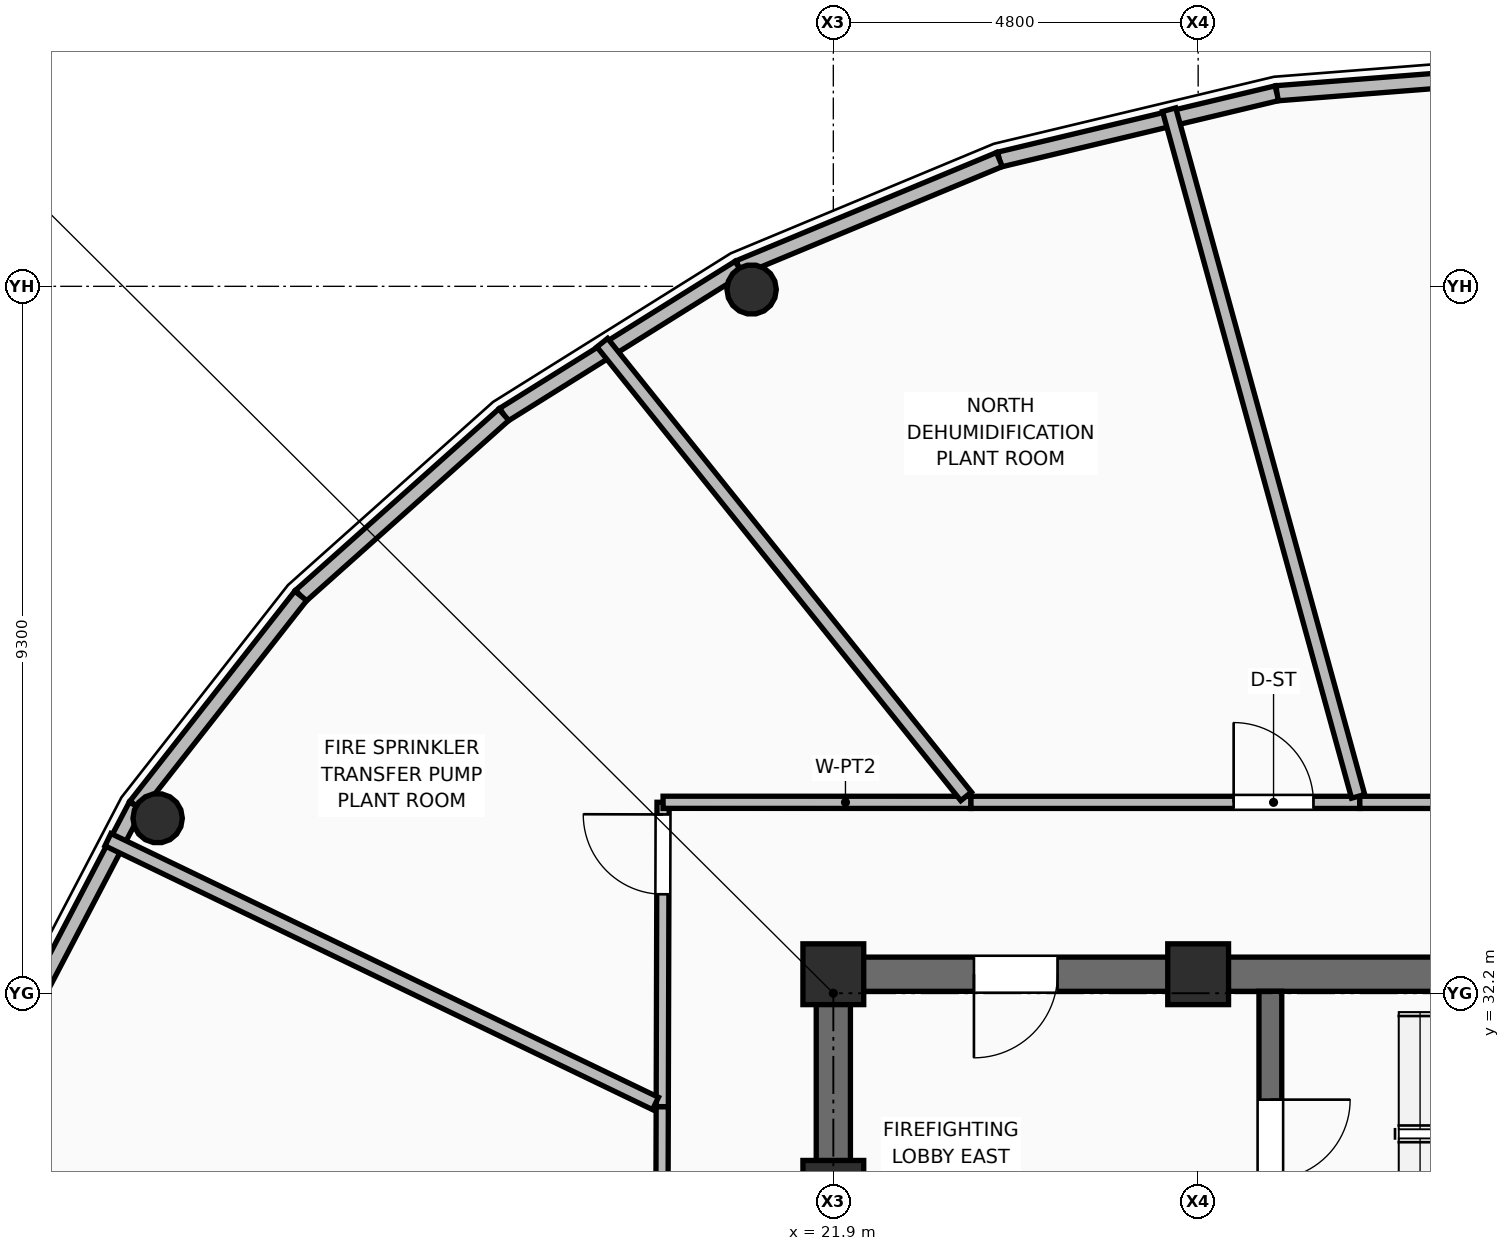
"""IFC4 building model, lengths in metres.
Left out: names, types, materials, properties, quantities, classifications, styles, units other than length and angle.
Written with IfcOpenShell. Run it as: python <this file> out.ifc"""

import sys

from ifc_helpers import new_model, si_unit, direction, frame, frame_2d, origin, origin_2d, place, context, subcontext, project, spatial, rectangle, hollow_circle, extrude, element, fill, save


model = new_model("IFC4")
c1 = context("Model", 3, precision=1e-05, world=origin(), true_north=direction((0.0, 1.0)))
c2 = subcontext(c1, "Body", "Model", "MODEL_VIEW")
j1 = project(units=[si_unit("LENGTHUNIT", "METRE"), si_unit("PLANEANGLEUNIT", "RADIAN")], contexts=[c1])
p1 = place(None, origin())
s1 = spatial("IfcSite", under=j1, at=p1, CompositionType="ELEMENT")
p2 = place(p1, origin())
s2 = spatial("IfcBuilding", under=s1, at=p2, CompositionType="ELEMENT")
p3 = place(p2, frame((0.0, 0.0, 253.65)))
s3 = spatial("IfcBuildingStorey", under=s2, at=p3, CompositionType="ELEMENT", Elevation=253.65)
for number, where, z_axis, x_axis in (
    (1, (21.9, 29.6, 0.0), (0.0, 0.0, 1.0), (1.0, 0.0, 0.0)),
    (2, (21.9, 32.45, 0.0), (0.0, 0.0, 1.0), (1.0, 0.0, 0.0)),
    (3, (26.7, 32.45, 0.0), (0.0, 0.0, 1.0), (1.0, 0.0, 0.0)),
):
    element("IfcColumn", number, at=place(p3, frame(where, z_axis=z_axis, x_axis=x_axis)), inside=s3, PredefinedType="COLUMN", context=c2, shape_type="SweptSolid", body=[
        extrude(rectangle(XDim=0.8, YDim=0.8, at=origin_2d()), origin(), (0.0, 0.0, 1.0), 5.4),
    ])
p4 = place(p3, frame((20.825, 41.458, 0.0), z_axis=(0.130171994019, -0.201410172818, 0.970818826691), x_axis=(0.839859571413, 0.542803740136, 0.0)))
e4 = element("IfcColumn", 4, at=p4, inside=s3, PredefinedType="COLUMN", context=c2, shape_type="SweptSolid", body=[
    extrude(hollow_circle(Radius=0.325, WallThickness=0.03, at=origin_2d()), origin(), (0.0, 0.0, 1.0), 5.377),
])
p5 = place(p3, frame((13.01, 34.502, 0.0), z_axis=(0.224793032222, -0.115835378923, 0.967496903175), x_axis=(0.458059425605, 0.888921572814, 0.0)))
e5 = element("IfcColumn", 5, at=p5, inside=s3, PredefinedType="COLUMN", context=c2, shape_type="SweptSolid", body=[
    extrude(hollow_circle(Radius=0.325, WallThickness=0.03, at=origin_2d()), origin(), (0.0, 0.0, 1.0), 5.396),
])
p6 = place(p3, frame((31.5, 44.334, 0.0), z_axis=(0.0, 0.0, 1.0), x_axis=(-0.996965983674, -0.077838469901, 0.0)))
e6 = element("IfcWall", 6, at=p6, inside=s3, PredefinedType="PARAPET", context=c2, shape_type="SweptSolid", body=[
    extrude(rectangle(XDim=3.776, YDim=0.2, at=frame_2d((1.888, 0.0))), origin(), (0.0, 0.0, 1.0), 1.12),
])
p7 = place(p3, frame((27.735, 44.04, 0.0), z_axis=(0.0, 0.0, 1.0), x_axis=(-0.972626535049, -0.23237388691, 0.0)))
e7 = element("IfcWall", 7, at=p7, inside=s3, PredefinedType="PARAPET", context=c2, shape_type="SweptSolid", body=[
    extrude(rectangle(XDim=3.753, YDim=0.2, at=frame_2d((1.876, 0.0))), origin(), (0.0, 0.0, 1.0), 1.12),
])
p8 = place(p3, frame((24.085, 43.168, 0.0), z_axis=(0.0, 0.0, 1.0), x_axis=(-0.92336680677, -0.383918923935, 0.0)))
e8 = element("IfcWall", 8, at=p8, inside=s3, PredefinedType="PARAPET", context=c2, shape_type="SweptSolid", body=[
    extrude(rectangle(XDim=3.709, YDim=0.2, at=frame_2d((1.854, 0.0))), origin(), (0.0, 0.0, 1.0), 1.12),
])
p9 = place(p3, frame((20.66, 41.744, 0.0), z_axis=(0.0, 0.0, 1.0), x_axis=(-0.84825750298, -0.529583995828, 0.0)))
e9 = element("IfcWall", 9, at=p9, inside=s3, PredefinedType="PARAPET", context=c2, shape_type="SweptSolid", body=[
    extrude(rectangle(XDim=3.65, YDim=0.2, at=frame_2d((1.825, 0.0))), origin(), (0.0, 0.0, 1.0), 1.12),
])
p10 = place(p3, frame((17.564, 39.811, 0.0), z_axis=(0.0, 0.0, 1.0), x_axis=(-0.74629085689, -0.665619979359, 0.0)))
e10 = element("IfcWall", 10, at=p10, inside=s3, PredefinedType="PARAPET", context=c2, shape_type="SweptSolid", body=[
    extrude(rectangle(XDim=3.58, YDim=0.2, at=frame_2d((1.79, 0.0))), origin(), (0.0, 0.0, 1.0), 1.12),
])
p11 = place(p3, frame((14.892, 37.428, 0.0), z_axis=(0.0, 0.0, 1.0), x_axis=(-0.617406744437, -0.786644082113, 0.0)))
e11 = element("IfcWall", 11, at=p11, inside=s3, PredefinedType="PARAPET", context=c2, shape_type="SweptSolid", body=[
    extrude(rectangle(XDim=3.51, YDim=0.2, at=frame_2d((1.755, 0.0))), origin(), (0.0, 0.0, 1.0), 1.12),
])
p12 = place(p3, frame((12.725, 34.667, 0.0), z_axis=(0.0, 0.0, 1.0), x_axis=(-0.463654949237, -0.886015850901, 0.0)))
e12 = element("IfcWall", 12, at=p12, inside=s3, PredefinedType="PARAPET", context=c2, shape_type="SweptSolid", body=[
    extrude(rectangle(XDim=3.447, YDim=0.2, at=frame_2d((1.723, 0.0))), origin(), (0.0, 0.0, 1.0), 1.12),
])
p13 = place(p3, frame((21.675, 32.45, 0.0), z_axis=(0.0, 0.0, 1.0), x_axis=(1.0, 0.0, 0.0)))
e13 = element("IfcWall", 13, at=p13, inside=s3, PredefinedType="SHEAR", context=c2, shape_type="SweptSolid", body=[
    extrude(rectangle(XDim=19.65, YDim=0.45, at=frame_2d((9.825, 0.0))), origin(), (0.0, 0.0, 1.0), 5.22),
])
p14 = place(p13, frame((2.075, 0.0, 0.0)))
e14 = element("IfcOpeningElement", 14, at=p14, cuts=e13, PredefinedType="OPENING", context=c2, shape_type="SweptSolid", body=[
    extrude(rectangle(XDim=1.1, YDim=2.1, at=frame_2d((0.55, 1.05))), frame((0.0, 0.235, 0.0), z_axis=(0.0, -1.0, 0.0), x_axis=(1.0, 0.0, 0.0)), (0.0, 0.0, 1.0), 0.47),
])
p15 = place(p13, frame((15.465, 0.0, 0.0)))
e15 = element("IfcOpeningElement", 15, at=p15, cuts=e13, PredefinedType="OPENING", context=c2, shape_type="SweptSolid", body=[
    extrude(rectangle(XDim=1.0, YDim=2.1, at=frame_2d((0.5, 1.05))), frame((0.0, 0.235, 0.0), z_axis=(0.0, -1.0, 0.0), x_axis=(1.0, 0.0, 0.0)), (0.0, 0.0, 1.0), 0.47),
])
p16 = place(p13, frame((17.475, 0.0, 0.0)))
e16 = element("IfcOpeningElement", 16, at=p16, cuts=e13, PredefinedType="OPENING", context=c2, shape_type="SweptSolid", body=[
    extrude(rectangle(XDim=0.9, YDim=2.1, at=frame_2d((0.45, 1.05))), frame((0.0, 0.235, 0.0), z_axis=(0.0, -1.0, 0.0), x_axis=(1.0, 0.0, 0.0)), (0.0, 0.0, 1.0), 0.47),
])
p17 = place(p3, frame((21.9, 18.025, 0.0), z_axis=(0.0, 0.0, 1.0), x_axis=(0.0, 1.0, 0.0)))
e17 = element("IfcWall", 17, at=p17, inside=s3, PredefinedType="SHEAR", context=c2, shape_type="SweptSolid", body=[
    extrude(rectangle(XDim=14.2, YDim=0.45, at=frame_2d((7.1, 0.0))), origin(), (0.0, 0.0, 1.0), 5.22),
])
p18 = place(p3, frame((27.65, 28.75, 0.0), z_axis=(0.0, 0.0, 1.0), x_axis=(0.0, 1.0, 0.0)))
e18 = element("IfcWall", 18, at=p18, inside=s3, PredefinedType="SHEAR", context=c2, shape_type="SweptSolid", body=[
    extrude(rectangle(XDim=3.475, YDim=0.3, at=frame_2d((1.738, 0.0))), origin(), (0.0, 0.0, 1.0), 5.22),
])
p19 = place(p18, frame((1.0, 0.0, 0.0)))
e19 = element("IfcOpeningElement", 19, at=p19, cuts=e18, PredefinedType="OPENING", context=c2, shape_type="SweptSolid", body=[
    extrude(rectangle(XDim=1.05, YDim=2.1, at=frame_2d((0.525, 1.05))), frame((0.0, 0.16, 0.0), z_axis=(0.0, -1.0, 0.0), x_axis=(1.0, 0.0, 0.0)), (0.0, 0.0, 1.0), 0.32),
])
p20 = place(p3, frame((19.636, 26.142, 0.0), z_axis=(0.0, 0.0, 1.0), x_axis=(0.002833910126, 0.999995984469, 0.0)))
e20 = element("IfcWall", 20, at=p20, inside=s3, PredefinedType="PARTITIONING", context=c2, shape_type="SweptSolid", body=[
    extrude(rectangle(XDim=4.566, YDim=0.16, at=frame_2d((2.283, 0.0))), origin(), (0.0, 0.0, 1.0), 5.2),
])
p21 = place(p20, frame((0.596, 0.0, 0.0)))
e21 = element("IfcOpeningElement", 21, at=p21, cuts=e20, PredefinedType="OPENING", context=c2, shape_type="SweptSolid", body=[
    extrude(rectangle(XDim=1.05, YDim=2.1, at=frame_2d((0.525, 1.05))), frame((0.0, 0.09, 0.0), z_axis=(0.0, -1.0, 0.0), x_axis=(1.0, 0.0, 0.0)), (0.0, 0.0, 1.0), 0.18),
])
p22 = place(p3, frame((19.649, 30.708, 0.0), z_axis=(0.0, 0.0, 1.0), x_axis=(0.00274389211, 0.999996235521, 0.0)))
e22 = element("IfcWall", 22, at=p22, inside=s3, PredefinedType="PARTITIONING", context=c2, shape_type="SweptSolid", body=[
    extrude(rectangle(XDim=4.004, YDim=0.16, at=frame_2d((2.002, 0.0))), origin(), (0.0, 0.0, 1.0), 4.733),
])
p23 = place(p22, frame((2.794, 0.0, 0.0)))
e23 = element("IfcOpeningElement", 23, at=p23, cuts=e22, PredefinedType="OPENING", context=c2, shape_type="SweptSolid", body=[
    extrude(rectangle(XDim=1.05, YDim=2.1, at=frame_2d((0.525, 1.05))), frame((0.0, 0.09, 0.0), z_axis=(0.0, -1.0, 0.0), x_axis=(1.0, 0.0, 0.0)), (0.0, 0.0, 1.0), 0.18),
])
p24 = place(p3, frame((19.66, 34.712, 0.0), z_axis=(0.0, 0.0, 1.0), x_axis=(0.999999970944, -0.000241065503, 0.0)))
e24 = element("IfcWall", 24, at=p24, inside=s3, PredefinedType="PARTITIONING", context=c2, shape_type="SweptSolid", body=[
    extrude(rectangle(XDim=4.051, YDim=0.16, at=frame_2d((2.025, 0.0))), origin(), (0.0, 0.0, 1.0), 4.733),
])
p25 = place(p3, frame((23.711, 34.711, 0.0), z_axis=(0.0, 0.0, 1.0), x_axis=(1.0, 0.0, 0.0)))
e25 = element("IfcWall", 25, at=p25, inside=s3, PredefinedType="PARTITIONING", context=c2, shape_type="SweptSolid", body=[
    extrude(rectangle(XDim=5.116, YDim=0.16, at=frame_2d((2.558, 0.0))), origin(), (0.0, 0.0, 1.0), 5.2),
])
p26 = place(p25, frame((3.456, 0.0, 0.0)))
e26 = element("IfcOpeningElement", 26, at=p26, cuts=e25, PredefinedType="OPENING", context=c2, shape_type="SweptSolid", body=[
    extrude(rectangle(XDim=1.05, YDim=2.1, at=frame_2d((0.525, 1.05))), frame((0.0, 0.09, 0.0), z_axis=(0.0, -1.0, 0.0), x_axis=(1.0, 0.0, 0.0)), (0.0, 0.0, 1.0), 0.18),
])
p27 = place(p3, frame((28.827, 34.711, 0.0), z_axis=(0.0, 0.0, 1.0), x_axis=(0.999999980556, -0.00019719976, 0.0)))
e27 = element("IfcWall", 27, at=p27, inside=s3, PredefinedType="PARTITIONING", context=c2, shape_type="SweptSolid", body=[
    extrude(rectangle(XDim=4.952, YDim=0.16, at=frame_2d((2.476, 0.0))), origin(), (0.0, 0.0, 1.0), 4.733),
])
p28 = place(p27, frame((1.951, 0.0, 0.0)))
e28 = element("IfcOpeningElement", 28, at=p28, cuts=e27, PredefinedType="OPENING", context=c2, shape_type="SweptSolid", body=[
    extrude(rectangle(XDim=1.05, YDim=2.1, at=frame_2d((0.525, 1.05))), frame((0.0, 0.09, 0.0), z_axis=(0.0, -1.0, 0.0), x_axis=(1.0, 0.0, 0.0)), (0.0, 0.0, 1.0), 0.18),
])
p29 = place(p3, frame((28.805, 34.79, 0.0), z_axis=(0.0, 0.0, 1.0), x_axis=(-0.265402950907, 0.96413758025, 0.0)))
e29 = element("IfcWall", 29, at=p29, inside=s3, PredefinedType="PARTITIONING", context=c2, shape_type="SweptSolid", body=[
    extrude(rectangle(XDim=9.37, YDim=0.18, at=frame_2d((4.685, 0.0))), origin(), (0.0, 0.0, 1.0), 4.575),
])
p30 = place(p3, frame((23.647, 34.79, 0.0), z_axis=(0.0, 0.0, 1.0), x_axis=(-0.62562461259, 0.780124249156, 0.0)))
e30 = element("IfcWall", 30, at=p30, inside=s3, PredefinedType="PARTITIONING", context=c2, shape_type="SweptSolid", body=[
    extrude(rectangle(XDim=7.651, YDim=0.18, at=frame_2d((3.826, 0.0))), origin(), (0.0, 0.0, 1.0), 4.575),
])
p31 = place(p3, frame((19.56, 30.75, 0.0), z_axis=(0.0, 0.0, 1.0), x_axis=(-0.900936685767, 0.433950559672, 0.0)))
e31 = element("IfcWall", 31, at=p31, inside=s3, PredefinedType="PARTITIONING", context=c2, shape_type="SweptSolid", body=[
    extrude(rectangle(XDim=7.996, YDim=0.18, at=frame_2d((3.998, 0.0))), origin(), (0.0, 0.0, 1.0), 4.575),
])
p32 = place(p19, frame((1.05, 0.0, 0.0), z_axis=(0.0, 0.0, 1.0), x_axis=(-1.0, 0.0, 0.0)))
e32 = element("IfcDoor", 32, at=p32, inside=s3, OperationType="SINGLE_SWING_LEFT", PredefinedType="DOOR", context=c2, shape_type="SweptSolid", body=[
    extrude(rectangle(XDim=1.05, YDim=2.1, at=frame_2d((0.525, 1.05))), frame((0.0, 0.025, 0.0), z_axis=(0.0, -1.0, 0.0), x_axis=(1.0, 0.0, 0.0)), (0.0, 0.0, 1.0), 0.05),
])
fill(e19, e32)
p33 = place(p14, frame((1.1, 0.0, 0.0), z_axis=(0.0, 0.0, 1.0), x_axis=(-1.0, 0.0, 0.0)))
e33 = element("IfcDoor", 33, at=p33, inside=s3, OperationType="SINGLE_SWING_RIGHT", PredefinedType="DOOR", context=c2, shape_type="SweptSolid", body=[
    extrude(rectangle(XDim=1.1, YDim=2.1, at=frame_2d((0.55, 1.05))), frame((0.0, 0.025, 0.0), z_axis=(0.0, -1.0, 0.0), x_axis=(1.0, 0.0, 0.0)), (0.0, 0.0, 1.0), 0.05),
])
fill(e14, e33)
p34 = place(p26, origin())
e34 = element("IfcDoor", 34, at=p34, inside=s3, OperationType="SINGLE_SWING_LEFT", PredefinedType="DOOR", context=c2, shape_type="SweptSolid", body=[
    extrude(rectangle(XDim=1.05, YDim=2.1, at=frame_2d((0.525, 1.05))), frame((0.0, 0.025, 0.0), z_axis=(0.0, -1.0, 0.0), x_axis=(1.0, 0.0, 0.0)), (0.0, 0.0, 1.0), 0.05),
])
fill(e26, e34)
p35 = place(p23, origin())
e35 = element("IfcDoor", 35, at=p35, inside=s3, OperationType="SINGLE_SWING_RIGHT", PredefinedType="DOOR", context=c2, shape_type="SweptSolid", body=[
    extrude(rectangle(XDim=1.05, YDim=2.1, at=frame_2d((0.525, 1.05))), frame((0.0, 0.025, 0.0), z_axis=(0.0, -1.0, 0.0), x_axis=(1.0, 0.0, 0.0)), (0.0, 0.0, 1.0), 0.05),
])
fill(e23, e35)
save(model, sys.argv[1])
